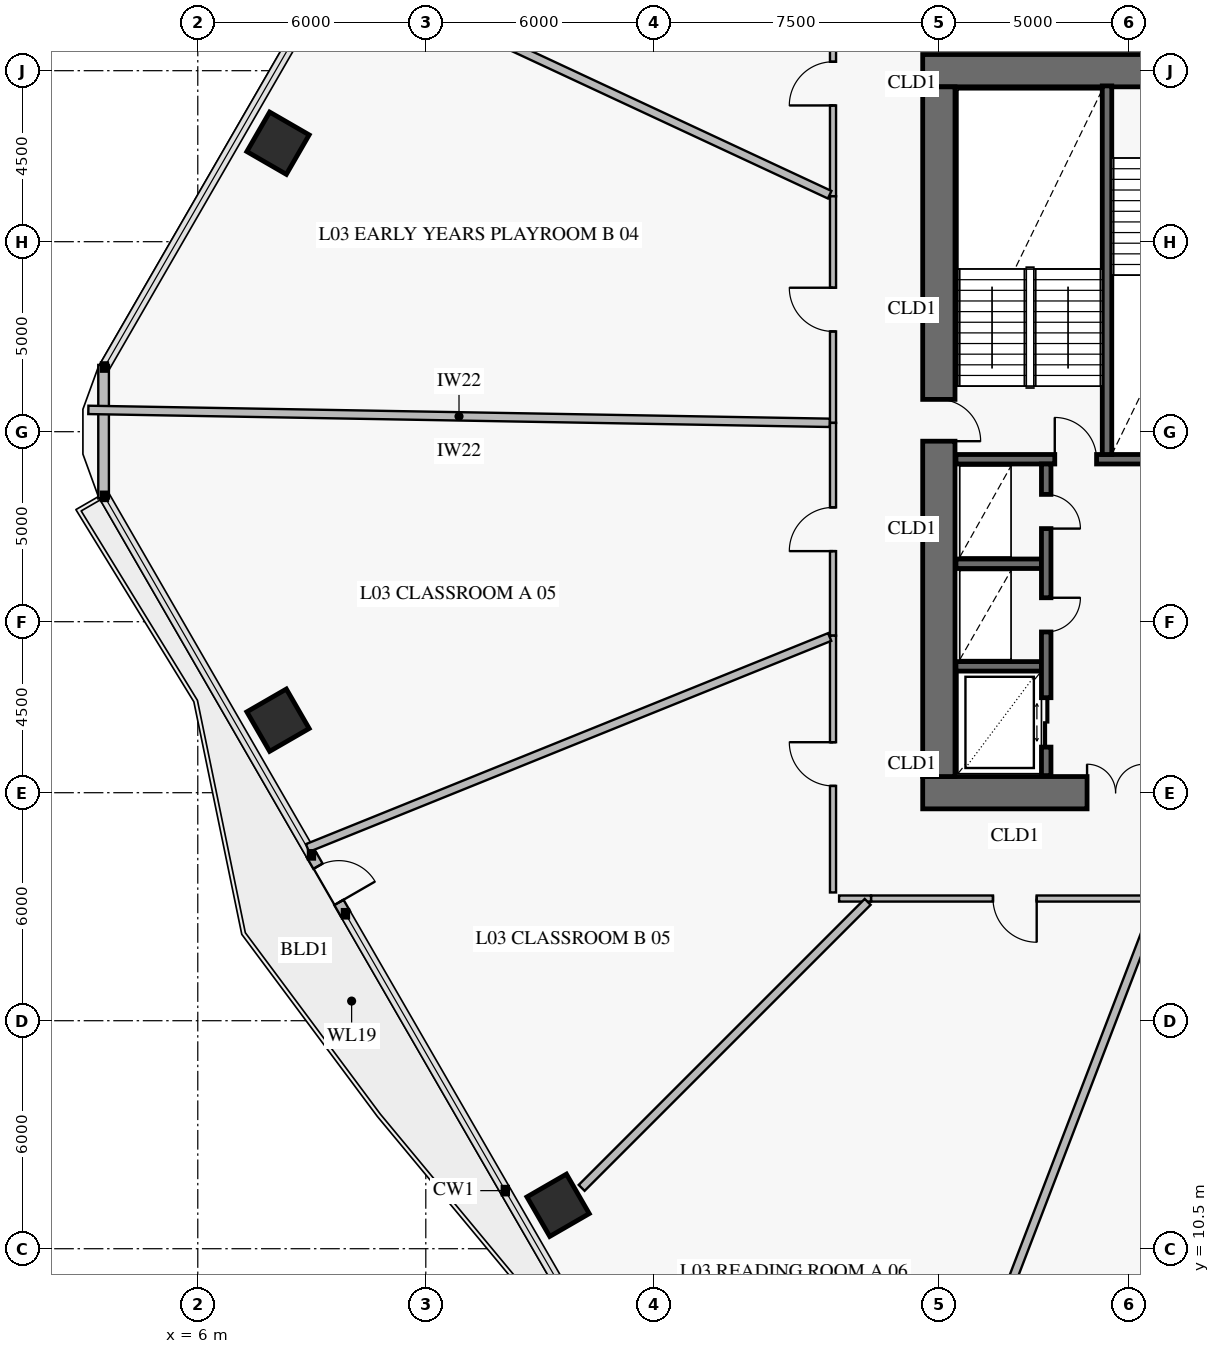
"""IFC4 building model, lengths in metres.
Left out: names, types, materials, properties, quantities, classifications, styles, units other than length and angle.
Written with IfcOpenShell. Run it as: python <this file> out.ifc"""

import sys

from ifc_helpers import new_model, si_unit, direction, frame, frame_2d, origin, origin_2d, place, context, subcontext, project, spatial, rectangle, extrude, element, fill, save


model = new_model("IFC4")
c1 = context("Model", 3, precision=1e-05, world=origin(), true_north=direction((0.0, 1.0)))
c2 = subcontext(c1, "Body", "Model", "MODEL_VIEW")
j1 = project(units=[si_unit("LENGTHUNIT", "METRE"), si_unit("PLANEANGLEUNIT", "RADIAN")], contexts=[c1])
p1 = place(None, origin())
s1 = spatial("IfcSite", under=j1, at=p1, CompositionType="ELEMENT")
p2 = place(p1, origin())
s2 = spatial("IfcBuilding", under=s1, at=p2, CompositionType="ELEMENT")
p3 = place(p2, frame((0.0, 0.0, 12.0)))
s3 = spatial("IfcBuildingStorey", under=s2, at=p3, CompositionType="ELEMENT", Elevation=12.0)
p4 = place(p3, frame((25.075, 22.5, 0.0), z_axis=(0.0, 0.0, 1.0), x_axis=(1.0, 0.0, 0.0)))
e1 = element("IfcWall", 1, at=p4, inside=s3, PredefinedType="SHEAR", context=c2, shape_type="SweptSolid", body=[
    extrude(rectangle(XDim=9.975, YDim=0.85, at=frame_2d((4.988, 0.0))), origin(), (0.0, 0.0, 1.0), 4.2),
])
p5 = place(p4, frame((4.325, 0.0, 0.0)))
e2 = element("IfcOpeningElement", 2, at=p5, cuts=e1, PredefinedType="OPENING", context=c2, shape_type="SweptSolid", body=[
    extrude(rectangle(XDim=1.5, YDim=2.15, at=frame_2d((0.75, 1.075))), frame((0.0, 0.437, 0.0), z_axis=(0.0, -1.0, 0.0), x_axis=(1.0, 0.0, 0.0)), (0.0, 0.0, 1.0), 0.874),
])
p6 = place(p3, frame((36.75, 41.5, 0.0), z_axis=(0.0, 0.0, 1.0), x_axis=(-1.0, 0.0, 0.0)))
e3 = element("IfcWall", 3, at=p6, inside=s3, PredefinedType="SHEAR", context=c2, shape_type="SweptSolid", body=[
    extrude(rectangle(XDim=11.675, YDim=0.85, at=frame_2d((5.837, 0.0))), origin(), (0.0, 0.0, 1.0), 4.2),
])
p7 = place(p6, frame((4.25, 0.0, 0.0)))
e4 = element("IfcOpeningElement", 4, at=p7, cuts=e3, PredefinedType="OPENING", context=c2, shape_type="SweptSolid", body=[
    extrude(rectangle(XDim=1.1, YDim=2.15, at=frame_2d((0.55, 1.075))), frame((0.0, 0.437, 0.0), z_axis=(0.0, -1.0, 0.0), x_axis=(1.0, 0.0, 0.0)), (0.0, 0.0, 1.0), 0.874),
])
p8 = place(p3, frame((25.5, 22.925, 0.0), z_axis=(0.0, 0.0, 1.0), x_axis=(0.0, 1.0, 0.0)))
e5 = element("IfcWall", 5, at=p8, inside=s3, PredefinedType="SHEAR", context=c2, shape_type="SweptSolid", body=[
    extrude(rectangle(XDim=18.15, YDim=0.85, at=frame_2d((9.075, 0.0))), origin(), (0.0, 0.0, 1.0), 4.2),
])
p9 = place(p8, frame((8.825, 0.0, 0.0)))
e6 = element("IfcOpeningElement", 6, at=p9, cuts=e5, PredefinedType="OPENING", context=c2, shape_type="SweptSolid", body=[
    extrude(rectangle(XDim=1.1, YDim=2.15, at=frame_2d((0.55, 1.075))), frame((0.0, 0.437, 0.0), z_axis=(0.0, -1.0, 0.0), x_axis=(1.0, 0.0, 0.0)), (0.0, 0.0, 1.0), 0.874),
])
for number, where, z_axis, x_axis in (
    (7, (8.111, 39.592, 0.0), (0.0, 0.0, 1.0), (-0.5, -0.866, 0.0)),
    (8, (8.111, 24.408, 0.0), (0.0, 0.0, 1.0), (0.5, -0.866, 0.0)),
    (9, (15.481, 11.643, 0.0), (0.0, 0.0, 1.0), (0.5, -0.866, 0.0)),
):
    element("IfcColumn", number, at=place(p3, frame(where, z_axis=z_axis, x_axis=x_axis)), inside=s3, PredefinedType="COLUMN", context=c2, shape_type="SweptSolid", body=[
        extrude(rectangle(XDim=1.2, YDim=1.2, at=origin_2d()), origin(), (0.0, 0.0, 1.0), 3.92),
    ])
p10 = place(p3, frame((9.886, 19.314, 0.0), z_axis=(0.0, 0.0, 1.0), x_axis=(-0.499982180423, 0.866035691677, 0.0)))
e10 = element("IfcWall", 10, at=p10, inside=s3, PredefinedType="SOLIDWALL", context=c2, shape_type="SweptSolid", body=[
    extrude(rectangle(XDim=1.79, YDim=0.28, at=frame_2d((0.895, 0.0))), origin(), (0.0, 0.0, 1.0), 3.92),
])
p11 = place(p10, frame((0.345, 0.0, 0.0)))
e11 = element("IfcOpeningElement", 11, at=p11, cuts=e10, PredefinedType="OPENING", context=c2, shape_type="SweptSolid", body=[
    extrude(rectangle(XDim=1.1, YDim=2.2, at=frame_2d((0.55, 1.1))), frame((0.0, 0.152, 0.0), z_axis=(0.0, -1.0, 0.0), x_axis=(1.0, 0.0, 0.0)), (0.0, 0.0, 1.0), 0.304),
])
p12 = place(p3, frame((3.521, 30.242, 0.0), z_axis=(0.0, 0.0, 1.0), x_axis=(0.0, 1.0, 0.0)))
e12 = element("IfcWall", 12, at=p12, inside=s3, PredefinedType="SOLIDWALL", context=c2, shape_type="SweptSolid", body=[
    extrude(rectangle(XDim=3.515, YDim=0.28, at=frame_2d((1.758, 0.0))), origin(), (0.0, 0.0, 1.0), 3.92),
])
p13 = place(p3, frame((25.95, 31.275, 0.0), z_axis=(0.0, 0.0, 1.0), x_axis=(1.0, 0.0, 0.0)))
e13 = element("IfcWall", 13, at=p13, inside=s3, PredefinedType="SOLIDWALL", context=c2, shape_type="SweptSolid", body=[
    extrude(rectangle(XDim=20.1, YDim=0.25, at=frame_2d((10.05, 0.0))), origin(), (0.0, 0.0, 1.0), 4.2),
])
p14 = place(p13, frame((2.6, 0.0, 0.0)))
e14 = element("IfcOpeningElement", 14, at=p14, cuts=e13, PredefinedType="OPENING", context=c2, shape_type="SweptSolid", body=[
    extrude(rectangle(XDim=1.1, YDim=2.15, at=frame_2d((0.55, 1.075))), frame((0.0, 0.137, 0.0), z_axis=(0.0, -1.0, 0.0), x_axis=(1.0, 0.0, 0.0)), (0.0, 0.0, 1.0), 0.274),
])
p15 = place(p13, frame((10.6, 0.0, 0.0)))
e15 = element("IfcOpeningElement", 15, at=p15, cuts=e13, PredefinedType="OPENING", context=c2, shape_type="SweptSolid", body=[
    extrude(rectangle(XDim=1.1, YDim=2.15, at=frame_2d((0.55, 1.075))), frame((0.0, 0.137, 0.0), z_axis=(0.0, -1.0, 0.0), x_axis=(1.0, 0.0, 0.0)), (0.0, 0.0, 1.0), 0.274),
])
p16 = place(p13, frame((16.35, 0.0, 0.0)))
e16 = element("IfcOpeningElement", 16, at=p16, cuts=e13, PredefinedType="OPENING", context=c2, shape_type="SweptSolid", body=[
    extrude(rectangle(XDim=1.1, YDim=2.15, at=frame_2d((0.55, 1.075))), frame((0.0, 0.137, 0.0), z_axis=(0.0, -1.0, 0.0), x_axis=(1.0, 0.0, 0.0)), (0.0, 0.0, 1.0), 0.274),
])
p17 = place(p3, frame((29.925, 31.4, 0.0), z_axis=(0.0, 0.0, 1.0), x_axis=(0.0, 1.0, 0.0)))
e17 = element("IfcWall", 17, at=p17, inside=s3, PredefinedType="SOLIDWALL", context=c2, shape_type="SweptSolid", body=[
    extrude(rectangle(XDim=9.7, YDim=0.25, at=frame_2d((4.85, 0.0))), origin(), (0.0, 0.0, 1.0), 4.2),
])
for number, where, z_axis, x_axis in (
    (18, (25.95, 25.825, 0.0), (0.0, 0.0, 1.0), (1.0, 0.0, 0.0)),
    (19, (25.95, 28.525, 0.0), (0.0, 0.0, 1.0), (1.0, 0.0, 0.0)),
):
    element("IfcWall", number, at=place(p3, frame(where, z_axis=z_axis, x_axis=x_axis)), inside=s3, PredefinedType="SOLIDWALL", context=c2, shape_type="SweptSolid", body=[
        extrude(rectangle(XDim=2.25, YDim=0.25, at=frame_2d((1.125, 0.0))), origin(), (0.0, 0.0, 1.0), 4.2),
    ])
p18 = place(p3, frame((28.325, 22.95, 0.0), z_axis=(0.0, 0.0, 1.0), x_axis=(0.0, 1.0, 0.0)))
e20 = element("IfcWall", 20, at=p18, inside=s3, PredefinedType="SOLIDWALL", context=c2, shape_type="SweptSolid", body=[
    extrude(rectangle(XDim=8.2, YDim=0.25, at=frame_2d((4.1, 0.0))), origin(), (0.0, 0.0, 1.0), 4.2),
])
p19 = place(p18, frame((0.75, 0.0, 0.0)))
e21 = element("IfcOpeningElement", 21, at=p19, cuts=e20, PredefinedType="OPENING", context=c2, shape_type="SweptSolid", body=[
    extrude(rectangle(XDim=1.3, YDim=2.3, at=frame_2d((0.65, 1.15))), frame((0.0, 0.137, 0.0), z_axis=(0.0, -1.0, 0.0), x_axis=(1.0, 0.0, 0.0)), (0.0, 0.0, 1.0), 0.274),
])
p20 = place(p18, frame((3.78, 0.0, 0.0)))
e22 = element("IfcOpeningElement", 22, at=p20, cuts=e20, PredefinedType="OPENING", context=c2, shape_type="SweptSolid", body=[
    extrude(rectangle(XDim=0.9, YDim=2.1, at=frame_2d((0.45, 1.05))), frame((0.0, 0.137, 0.0), z_axis=(0.0, -1.0, 0.0), x_axis=(1.0, 0.0, 0.0)), (0.0, 0.0, 1.0), 0.274),
])
p21 = place(p18, frame((6.5, 0.0, 0.0)))
e23 = element("IfcOpeningElement", 23, at=p21, cuts=e20, PredefinedType="OPENING", context=c2, shape_type="SweptSolid", body=[
    extrude(rectangle(XDim=0.9, YDim=2.1, at=frame_2d((0.45, 1.05))), frame((0.0, 0.137, 0.0), z_axis=(0.0, -1.0, 0.0), x_axis=(1.0, 0.0, 0.0)), (0.0, 0.0, 1.0), 0.274),
])
p22 = place(p3, frame((22.715, 44.125, 0.0), z_axis=(0.0, 0.0, 1.0), x_axis=(0.0, -1.0, 0.0)))
e24 = element("IfcWall", 24, at=p22, inside=s3, PredefinedType="PARTITIONING", context=c2, shape_type="SweptSolid", body=[
    extrude(rectangle(XDim=5.93, YDim=0.16, at=frame_2d((2.965, 0.0))), origin(), (0.0, 0.0, 1.0), 3.92),
])
p23 = place(p22, frame((2.39, 0.0, 0.0)))
e25 = element("IfcOpeningElement", 25, at=p23, cuts=e24, PredefinedType="OPENING", context=c2, shape_type="SweptSolid", body=[
    extrude(rectangle(XDim=1.15, YDim=2.2, at=frame_2d((0.575, 1.1))), frame((0.0, 0.092, 0.0), z_axis=(0.0, -1.0, 0.0), x_axis=(1.0, 0.0, 0.0)), (0.0, 0.0, 1.0), 0.184),
])
p24 = place(p3, frame((22.715, 38.195, 0.0), z_axis=(0.0, 0.0, 1.0), x_axis=(0.0, -1.0, 0.0)))
e26 = element("IfcWall", 26, at=p24, inside=s3, PredefinedType="PARTITIONING", context=c2, shape_type="SweptSolid", body=[
    extrude(rectangle(XDim=5.963, YDim=0.16, at=frame_2d((2.981, 0.0))), origin(), (0.0, 0.0, 1.0), 3.22),
])
p25 = place(p24, frame((2.406, 0.0, 0.0)))
e27 = element("IfcOpeningElement", 27, at=p25, cuts=e26, PredefinedType="OPENING", context=c2, shape_type="SweptSolid", body=[
    extrude(rectangle(XDim=1.15, YDim=2.2, at=frame_2d((0.575, 1.1))), frame((0.0, 0.092, 0.0), z_axis=(0.0, -1.0, 0.0), x_axis=(1.0, 0.0, 0.0)), (0.0, 0.0, 1.0), 0.184),
])
p26 = place(p3, frame((22.715, 32.232, 0.0), z_axis=(0.0, 0.0, 1.0), x_axis=(0.0, -1.0, 0.0)))
e28 = element("IfcWall", 28, at=p26, inside=s3, PredefinedType="PARTITIONING", context=c2, shape_type="SweptSolid", body=[
    extrude(rectangle(XDim=5.599, YDim=0.16, at=frame_2d((2.8, 0.0))), origin(), (0.0, 0.0, 1.0), 3.22),
])
p27 = place(p26, frame((2.225, 0.0, 0.0)))
e29 = element("IfcOpeningElement", 29, at=p27, cuts=e28, PredefinedType="OPENING", context=c2, shape_type="SweptSolid", body=[
    extrude(rectangle(XDim=1.15, YDim=2.2, at=frame_2d((0.575, 1.1))), frame((0.0, 0.092, 0.0), z_axis=(0.0, -1.0, 0.0), x_axis=(1.0, 0.0, 0.0)), (0.0, 0.0, 1.0), 0.184),
])
p28 = place(p3, frame((22.715, 26.633, 0.0), z_axis=(0.0, 0.0, 1.0), x_axis=(0.0, -1.0, 0.0)))
e30 = element("IfcWall", 30, at=p28, inside=s3, PredefinedType="PARTITIONING", context=c2, shape_type="SweptSolid", body=[
    extrude(rectangle(XDim=6.758, YDim=0.16, at=frame_2d((3.379, 0.0))), origin(), (0.0, 0.0, 1.0), 3.92),
])
p29 = place(p28, frame((2.804, 0.0, 0.0)))
e31 = element("IfcOpeningElement", 31, at=p29, cuts=e30, PredefinedType="OPENING", context=c2, shape_type="SweptSolid", body=[
    extrude(rectangle(XDim=1.15, YDim=2.2, at=frame_2d((0.575, 1.1))), frame((0.0, 0.092, 0.0), z_axis=(0.0, -1.0, 0.0), x_axis=(1.0, 0.0, 0.0)), (0.0, 0.0, 1.0), 0.184),
])
p30 = place(p3, frame((23.715, 19.715, 0.0), z_axis=(0.0, 0.0, 1.0), x_axis=(1.0, 0.0, 0.0)))
e32 = element("IfcWall", 32, at=p30, inside=s3, PredefinedType="PARTITIONING", context=c2, shape_type="SweptSolid", body=[
    extrude(rectangle(XDim=7.569, YDim=0.16, at=frame_2d((3.785, 0.0))), origin(), (0.0, 0.0, 1.0), 3.22),
])
p31 = place(p30, frame((3.21, 0.0, 0.0)))
e33 = element("IfcOpeningElement", 33, at=p31, cuts=e32, PredefinedType="OPENING", context=c2, shape_type="SweptSolid", body=[
    extrude(rectangle(XDim=1.15, YDim=2.2, at=frame_2d((0.575, 1.1))), frame((0.0, 0.092, 0.0), z_axis=(0.0, -1.0, 0.0), x_axis=(1.0, 0.0, 0.0)), (0.0, 0.0, 1.0), 0.184),
])
p32 = place(p3, frame((22.627, 38.236, 0.0), z_axis=(0.0, 0.0, 1.0), x_axis=(-0.906309468756, 0.422614655263, 0.0)))
e34 = element("IfcWall", 34, at=p32, inside=s3, PredefinedType="PARTITIONING", context=c2, shape_type="SweptSolid", body=[
    extrude(rectangle(XDim=14.313, YDim=0.22, at=frame_2d((7.157, 0.0))), origin(), (0.0, 0.0, 1.0), 3.17),
])
p33 = place(p3, frame((22.627, 32.233, 0.0), z_axis=(0.0, 0.0, 1.0), x_axis=(-0.999847613209, 0.017457100559, 0.0)))
e35 = element("IfcWall", 35, at=p33, inside=s3, PredefinedType="PARTITIONING", context=c2, shape_type="SweptSolid", body=[
    extrude(rectangle(XDim=19.509, YDim=0.22, at=frame_2d((9.755, 0.0))), origin(), (0.0, 0.0, 1.0), 3.17),
])
p34 = place(p3, frame((22.627, 26.597, 0.0), z_axis=(0.0, 0.0, 1.0), x_axis=(-0.927186166431, -0.3746008713, 0.0)))
e36 = element("IfcWall", 36, at=p34, inside=s3, PredefinedType="PARTITIONING", context=c2, shape_type="SweptSolid", body=[
    extrude(rectangle(XDim=14.82, YDim=0.22, at=frame_2d((7.41, 0.0))), origin(), (0.0, 0.0, 1.0), 3.17),
])
p35 = place(p3, frame((22.875, 19.715, 0.0), z_axis=(0.0, 0.0, 1.0), x_axis=(1.0, 0.0, 0.0)))
e37 = element("IfcWall", 37, at=p35, inside=s3, PredefinedType="PARTITIONING", context=c2, shape_type="SweptSolid", body=[
    extrude(rectangle(XDim=0.84, YDim=0.16, at=frame_2d((0.42, 0.0))), origin(), (0.0, 0.0, 1.0), 3.22),
])
p36 = place(p3, frame((23.627, 19.627, 0.0), z_axis=(0.0, 0.0, 1.0), x_axis=(-0.707106781187, -0.707106781187, 0.0)))
e38 = element("IfcWall", 38, at=p36, inside=s3, PredefinedType="PARTITIONING", context=c2, shape_type="SweptSolid", body=[
    extrude(rectangle(XDim=10.643, YDim=0.22, at=frame_2d((5.322, 0.0))), origin(), (0.0, 0.0, 1.0), 3.22),
])
p37 = place(p3, frame((31.25, 19.627, 0.0), z_axis=(0.0, 0.0, 1.0), x_axis=(-0.358374904207, -0.933577756823, 0.0)))
e39 = element("IfcWall", 39, at=p37, inside=s3, PredefinedType="PARTITIONING", context=c2, shape_type="SweptSolid", body=[
    extrude(rectangle(XDim=17.765, YDim=0.22, at=frame_2d((8.883, 0.0))), origin(), (0.0, 0.0, 1.0), 3.17),
])
p38 = place(p11, frame((1.1, 0.0, 0.0), z_axis=(0.0, 0.0, 1.0), x_axis=(-1.0, 0.0, 0.0)))
e40 = element("IfcDoor", 40, at=p38, inside=s3, OperationType="SINGLE_SWING_RIGHT", PredefinedType="DOOR", context=c2, shape_type="SweptSolid", body=[
    extrude(rectangle(XDim=1.1, YDim=2.2, at=frame_2d((0.55, 1.1))), frame((0.0, 0.025, 0.0), z_axis=(0.0, -1.0, 0.0), x_axis=(1.0, 0.0, 0.0)), (0.0, 0.0, 1.0), 0.05),
])
fill(e11, e40)
p39 = place(p9, frame((1.1, 0.0, 0.0), z_axis=(0.0, 0.0, 1.0), x_axis=(-1.0, 0.0, 0.0)))
e41 = element("IfcDoor", 41, at=p39, inside=s3, OperationType="SINGLE_SWING_RIGHT", PredefinedType="USERDEFINED", context=c2, shape_type="SweptSolid", body=[
    extrude(rectangle(XDim=1.1, YDim=2.15, at=frame_2d((0.55, 1.075))), frame((0.0, 0.025, 0.0), z_axis=(0.0, -1.0, 0.0), x_axis=(1.0, 0.0, 0.0)), (0.0, 0.0, 1.0), 0.05),
])
fill(e6, e41)
p40 = place(p5, origin())
e42 = element("IfcDoor", 42, at=p40, inside=s3, OperationType="DOUBLE_DOOR_SINGLE_SWING", PredefinedType="DOOR", context=c2, shape_type="SweptSolid", body=[
    extrude(rectangle(XDim=1.5, YDim=2.15, at=frame_2d((0.75, 1.075))), frame((0.0, 0.025, 0.0), z_axis=(0.0, -1.0, 0.0), x_axis=(1.0, 0.0, 0.0)), (0.0, 0.0, 1.0), 0.05),
])
fill(e2, e42)
p41 = place(p14, origin())
e43 = element("IfcDoor", 43, at=p41, inside=s3, OperationType="SINGLE_SWING_LEFT", PredefinedType="USERDEFINED", context=c2, shape_type="SweptSolid", body=[
    extrude(rectangle(XDim=1.1, YDim=2.15, at=frame_2d((0.55, 1.075))), frame((0.0, 0.025, 0.0), z_axis=(0.0, -1.0, 0.0), x_axis=(1.0, 0.0, 0.0)), (0.0, 0.0, 1.0), 0.05),
])
fill(e14, e43)
p42 = place(p19, frame((1.3, 0.0, 0.0), z_axis=(0.0, 0.0, 1.0), x_axis=(-1.0, 0.0, 0.0)))
e44 = element("IfcDoor", 44, at=p42, inside=s3, OperationType="DOUBLE_DOOR_SLIDING", PredefinedType="DOOR", context=c2, shape_type="SweptSolid", body=[
    extrude(rectangle(XDim=1.3, YDim=2.3, at=frame_2d((0.65, 1.15))), frame((0.0, 0.025, 0.0), z_axis=(0.0, -1.0, 0.0), x_axis=(1.0, 0.0, 0.0)), (0.0, 0.0, 1.0), 0.05),
])
fill(e21, e44)
p43 = place(p20, frame((0.9, 0.0, 0.0), z_axis=(0.0, 0.0, 1.0), x_axis=(-1.0, 0.0, 0.0)))
e45 = element("IfcDoor", 45, at=p43, inside=s3, OperationType="SINGLE_SWING_LEFT", PredefinedType="DOOR", context=c2, shape_type="SweptSolid", body=[
    extrude(rectangle(XDim=0.9, YDim=2.1, at=frame_2d((0.45, 1.05))), frame((0.0, 0.025, 0.0), z_axis=(0.0, -1.0, 0.0), x_axis=(1.0, 0.0, 0.0)), (0.0, 0.0, 1.0), 0.05),
])
fill(e22, e45)
p44 = place(p21, frame((0.9, 0.0, 0.0), z_axis=(0.0, 0.0, 1.0), x_axis=(-1.0, 0.0, 0.0)))
e46 = element("IfcDoor", 46, at=p44, inside=s3, OperationType="SINGLE_SWING_RIGHT", PredefinedType="DOOR", context=c2, shape_type="SweptSolid", body=[
    extrude(rectangle(XDim=0.9, YDim=2.1, at=frame_2d((0.45, 1.05))), frame((0.0, 0.025, 0.0), z_axis=(0.0, -1.0, 0.0), x_axis=(1.0, 0.0, 0.0)), (0.0, 0.0, 1.0), 0.05),
])
fill(e23, e46)
p45 = place(p23, frame((1.15, 0.0, 0.0), z_axis=(0.0, 0.0, 1.0), x_axis=(-1.0, 0.0, 0.0)))
e47 = element("IfcDoor", 47, at=p45, inside=s3, OperationType="SINGLE_SWING_LEFT", PredefinedType="DOOR", context=c2, shape_type="SweptSolid", body=[
    extrude(rectangle(XDim=1.15, YDim=2.2, at=frame_2d((0.575, 1.1))), frame((0.0, 0.025, 0.0), z_axis=(0.0, -1.0, 0.0), x_axis=(1.0, 0.0, 0.0)), (0.0, 0.0, 1.0), 0.05),
])
fill(e25, e47)
p46 = place(p25, frame((1.15, 0.0, 0.0), z_axis=(0.0, 0.0, 1.0), x_axis=(-1.0, 0.0, 0.0)))
e48 = element("IfcDoor", 48, at=p46, inside=s3, OperationType="SINGLE_SWING_RIGHT", PredefinedType="DOOR", context=c2, shape_type="SweptSolid", body=[
    extrude(rectangle(XDim=1.15, YDim=2.2, at=frame_2d((0.575, 1.1))), frame((0.0, 0.025, 0.0), z_axis=(0.0, -1.0, 0.0), x_axis=(1.0, 0.0, 0.0)), (0.0, 0.0, 1.0), 0.05),
])
fill(e27, e48)
p47 = place(p27, frame((1.15, 0.0, 0.0), z_axis=(0.0, 0.0, 1.0), x_axis=(-1.0, 0.0, 0.0)))
e49 = element("IfcDoor", 49, at=p47, inside=s3, OperationType="SINGLE_SWING_LEFT", PredefinedType="DOOR", context=c2, shape_type="SweptSolid", body=[
    extrude(rectangle(XDim=1.15, YDim=2.2, at=frame_2d((0.575, 1.1))), frame((0.0, 0.025, 0.0), z_axis=(0.0, -1.0, 0.0), x_axis=(1.0, 0.0, 0.0)), (0.0, 0.0, 1.0), 0.05),
])
fill(e29, e49)
p48 = place(p29, frame((1.15, 0.0, 0.0), z_axis=(0.0, 0.0, 1.0), x_axis=(-1.0, 0.0, 0.0)))
e50 = element("IfcDoor", 50, at=p48, inside=s3, OperationType="SINGLE_SWING_RIGHT", PredefinedType="DOOR", context=c2, shape_type="SweptSolid", body=[
    extrude(rectangle(XDim=1.15, YDim=2.2, at=frame_2d((0.575, 1.1))), frame((0.0, 0.025, 0.0), z_axis=(0.0, -1.0, 0.0), x_axis=(1.0, 0.0, 0.0)), (0.0, 0.0, 1.0), 0.05),
])
fill(e31, e50)
p49 = place(p31, frame((1.15, 0.0, 0.0), z_axis=(0.0, 0.0, 1.0), x_axis=(-1.0, 0.0, 0.0)))
e51 = element("IfcDoor", 51, at=p49, inside=s3, OperationType="SINGLE_SWING_LEFT", PredefinedType="DOOR", context=c2, shape_type="SweptSolid", body=[
    extrude(rectangle(XDim=1.15, YDim=2.2, at=frame_2d((0.575, 1.1))), frame((0.0, 0.025, 0.0), z_axis=(0.0, -1.0, 0.0), x_axis=(1.0, 0.0, 0.0)), (0.0, 0.0, 1.0), 0.05),
])
fill(e33, e51)
save(model, sys.argv[1])
